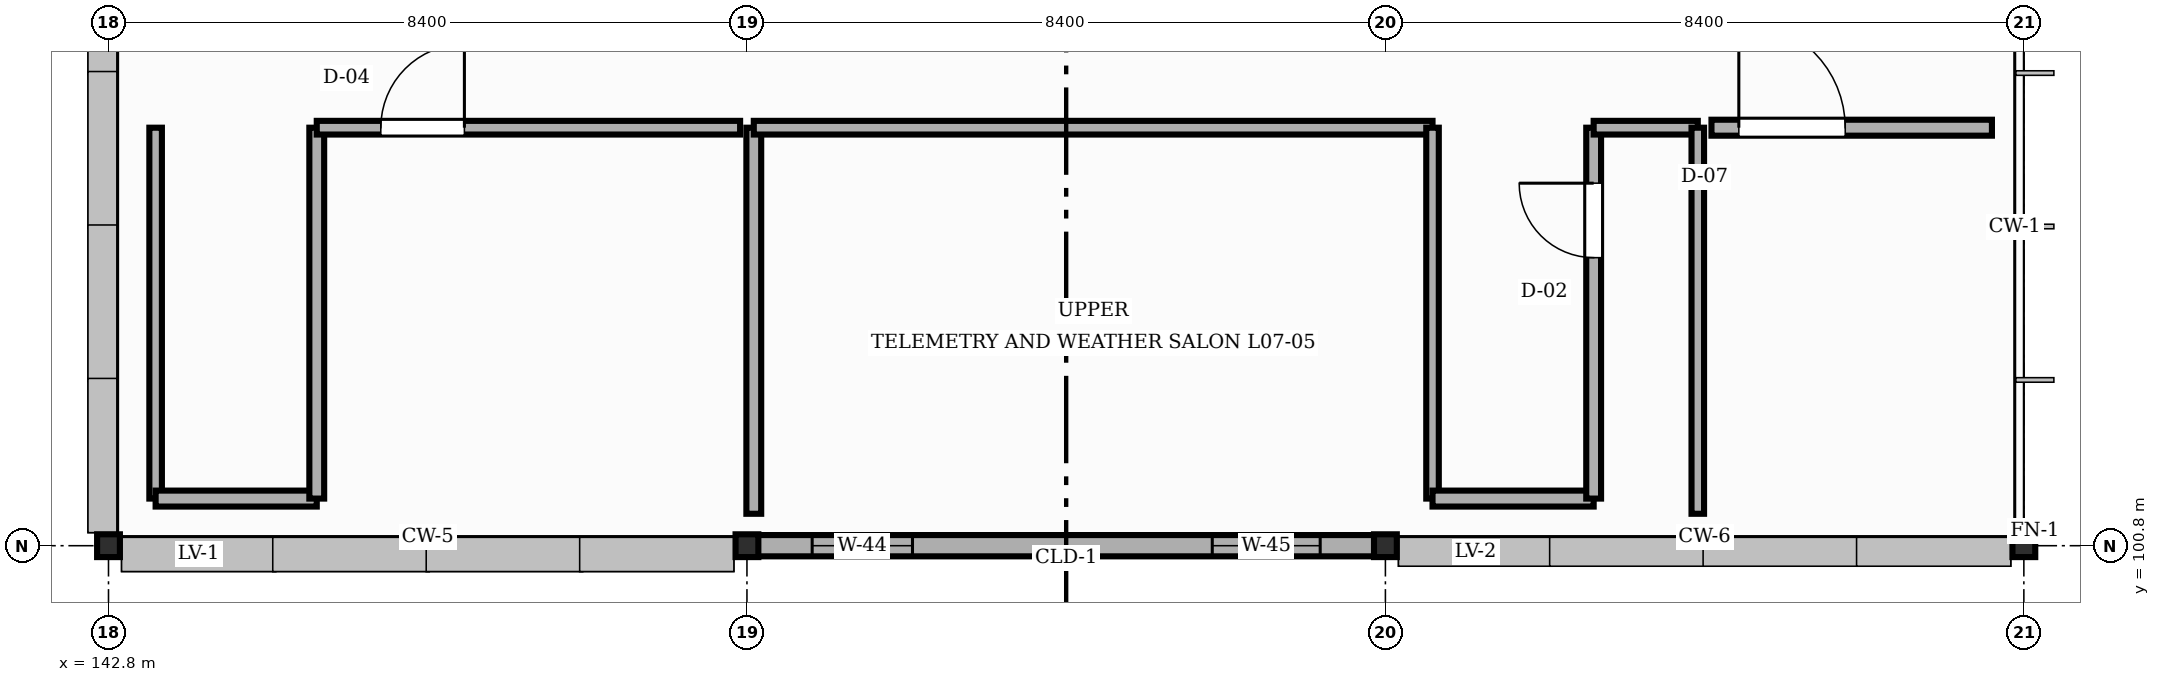
"""IFC4 building model, lengths in metres.
Left out: names, types, materials, properties, quantities, classifications, styles, units other than length and angle.
Written with IfcOpenShell. Run it as: python <this file> out.ifc"""

import sys

from ifc_helpers import new_model, si_unit, direction, frame, frame_2d, origin, origin_2d, place, context, subcontext, project, spatial, rectangle, i_section, extrude, element, fill, save


model = new_model("IFC4")
c1 = context("Model", 3, precision=1e-05, world=origin(), true_north=direction((0.0, 1.0)))
c2 = subcontext(c1, "Body", "Model", "MODEL_VIEW")
j1 = project(units=[si_unit("LENGTHUNIT", "METRE"), si_unit("PLANEANGLEUNIT", "RADIAN")], contexts=[c1])
p1 = place(None, origin())
s1 = spatial("IfcSite", under=j1, at=p1, CompositionType="ELEMENT")
p2 = place(p1, origin())
s2 = spatial("IfcBuilding", under=s1, at=p2, CompositionType="ELEMENT")
p3 = place(p2, frame((0.0, 0.0, 30.15)))
s3 = spatial("IfcBuildingStorey", under=s2, at=p3, CompositionType="ELEMENT", Elevation=30.15)
for number, where, z_axis, x_axis in (
    (1, (142.8, 100.8, 0.0), (0.0, 0.0, 1.0), (1.0, 0.0, 0.0)),
    (2, (151.2, 100.8, 0.0), (0.0, 0.0, 1.0), (1.0, 0.0, 0.0)),
    (3, (159.6, 100.8, 0.0), (0.0, 0.0, 1.0), (1.0, 0.0, 0.0)),
    (4, (168.0, 100.8, 0.0), (0.0, 0.0, 1.0), (1.0, 0.0, 0.0)),
):
    element("IfcColumn", number, at=place(p3, frame(where, z_axis=z_axis, x_axis=x_axis)), inside=s3, PredefinedType="COLUMN", context=c2, shape_type="SweptSolid", body=[
        extrude(i_section(OverallWidth=0.3, OverallDepth=0.3, WebThickness=0.011, FlangeThickness=0.019, FilletRadius=0.027, at=origin_2d()), origin(), (0.0, 0.0, 1.0), 4.2),
    ])
p4 = place(p3, frame((151.208, 100.8, 0.0), z_axis=(0.0, 0.0, 1.0), x_axis=(1.0, 0.0, 0.0)))
e5 = element("IfcWall", 5, at=p4, inside=s3, PredefinedType="STANDARD", context=c2, shape_type="SweptSolid", body=[
    extrude(rectangle(XDim=8.384, YDim=0.28, at=frame_2d((4.192, 0.0))), origin(), (0.0, 0.0, 1.0), 3.622),
])
p5 = place(p4, frame((0.85, 0.0, 0.9)))
e6 = element("IfcOpeningElement", 6, at=p5, cuts=e5, PredefinedType="OPENING", context=c2, shape_type="SweptSolid", body=[
    extrude(rectangle(XDim=1.32, YDim=1.85, at=frame_2d((0.66, 0.925))), frame((0.0, 0.15, 0.0), z_axis=(0.0, -1.0, 0.0), x_axis=(1.0, 0.0, 0.0)), (0.0, 0.0, 1.0), 0.3),
])
p6 = place(p4, frame((6.114, 0.0, 0.9)))
e7 = element("IfcOpeningElement", 7, at=p6, cuts=e5, PredefinedType="OPENING", context=c2, shape_type="SweptSolid", body=[
    extrude(rectangle(XDim=1.42, YDim=1.85, at=frame_2d((0.71, 0.925))), frame((0.0, 0.15, 0.0), z_axis=(0.0, -1.0, 0.0), x_axis=(1.0, 0.0, 0.0)), (0.0, 0.0, 1.0), 0.3),
])
p7 = place(p3, frame((151.29, 101.22, -0.004), z_axis=(0.0, 0.0, 1.0), x_axis=(0.0, 1.0, 0.0)))
e8 = element("IfcWall", 8, at=p7, inside=s3, PredefinedType="STANDARD", context=c2, shape_type="SweptSolid", body=[
    extrude(rectangle(XDim=5.08, YDim=0.195, at=frame_2d((2.54, 0.0))), origin(), (0.0, 0.0, 1.0), 3.626),
])
p8 = place(p3, frame((151.29, 106.3, -0.004), z_axis=(0.0, 0.0, 1.0), x_axis=(1.0, 0.0, 0.0)))
e9 = element("IfcWall", 9, at=p8, inside=s3, PredefinedType="STANDARD", context=c2, shape_type="SweptSolid", body=[
    extrude(rectangle(XDim=8.93, YDim=0.18, at=frame_2d((4.465, 0.0))), origin(), (0.0, 0.0, 1.0), 4.004),
])
p9 = place(p3, frame((160.22, 106.3, -0.004), z_axis=(0.0, 0.0, 1.0), x_axis=(0.0, -1.0, 0.0)))
e10 = element("IfcWall", 10, at=p9, inside=s3, PredefinedType="STANDARD", context=c2, shape_type="SweptSolid", body=[
    extrude(rectangle(XDim=4.88, YDim=0.165, at=frame_2d((2.44, 0.0))), origin(), (0.0, 0.0, 1.0), 4.004),
])
p10 = place(p3, frame((160.22, 101.42, -0.004), z_axis=(0.0, 0.0, 1.0), x_axis=(1.0, 0.0, 0.0)))
e11 = element("IfcWall", 11, at=p10, inside=s3, PredefinedType="STANDARD", context=c2, shape_type="SweptSolid", body=[
    extrude(rectangle(XDim=2.12, YDim=0.21, at=frame_2d((1.06, 0.0))), origin(), (0.0, 0.0, 1.0), 4.004),
])
p11 = place(p3, frame((162.34, 101.42, -0.004), z_axis=(0.0, 0.0, 1.0), x_axis=(0.0, 1.0, 0.0)))
e12 = element("IfcWall", 12, at=p11, inside=s3, PredefinedType="STANDARD", context=c2, shape_type="SweptSolid", body=[
    extrude(rectangle(XDim=4.88, YDim=0.195, at=frame_2d((2.44, 0.0))), origin(), (0.0, 0.0, 1.0), 3.716),
])
p12 = place(p11, frame((3.17, 0.0, 0.0)))
e13 = element("IfcOpeningElement", 13, at=p12, cuts=e12, PredefinedType="OPENING", context=c2, shape_type="SweptSolid", body=[
    extrude(rectangle(XDim=0.98, YDim=2.06, at=frame_2d((0.49, 1.03))), frame((0.0, 0.107, 0.0), z_axis=(0.0, -1.0, 0.0), x_axis=(1.0, 0.0, 0.0)), (0.0, 0.0, 1.0), 0.215),
])
p13 = place(p3, frame((162.34, 106.3, -0.004), z_axis=(0.0, 0.0, 1.0), x_axis=(1.0, 0.0, 0.0)))
e14 = element("IfcWall", 14, at=p13, inside=s3, PredefinedType="STANDARD", context=c2, shape_type="SweptSolid", body=[
    extrude(rectangle(XDim=1.37, YDim=0.18, at=frame_2d((0.685, 0.0))), origin(), (0.0, 0.0, 1.0), 4.004),
])
p14 = place(p3, frame((163.71, 106.3, -0.004), z_axis=(0.0, 0.0, 1.0), x_axis=(0.0, -1.0, 0.0)))
e15 = element("IfcWall", 15, at=p14, inside=s3, PredefinedType="STANDARD", context=c2, shape_type="SweptSolid", body=[
    extrude(rectangle(XDim=5.08, YDim=0.165, at=frame_2d((2.54, 0.0))), origin(), (0.0, 0.0, 1.0), 4.004),
])
p15 = place(p3, frame((143.42, 106.3, -0.004), z_axis=(0.0, 0.0, 1.0), x_axis=(0.0, -1.0, 0.0)))
e16 = element("IfcWall", 16, at=p15, inside=s3, PredefinedType="STANDARD", context=c2, shape_type="SweptSolid", body=[
    extrude(rectangle(XDim=4.88, YDim=0.165, at=frame_2d((2.44, 0.0))), origin(), (0.0, 0.0, 1.0), 4.004),
])
p16 = place(p3, frame((143.42, 101.42, -0.004), z_axis=(0.0, 0.0, 1.0), x_axis=(1.0, 0.0, 0.0)))
e17 = element("IfcWall", 17, at=p16, inside=s3, PredefinedType="STANDARD", context=c2, shape_type="SweptSolid", body=[
    extrude(rectangle(XDim=2.12, YDim=0.21, at=frame_2d((1.06, 0.0))), origin(), (0.0, 0.0, 1.0), 4.004),
])
p17 = place(p3, frame((145.54, 101.42, -0.004), z_axis=(0.0, 0.0, 1.0), x_axis=(0.0, 1.0, 0.0)))
e18 = element("IfcWall", 18, at=p17, inside=s3, PredefinedType="STANDARD", context=c2, shape_type="SweptSolid", body=[
    extrude(rectangle(XDim=4.88, YDim=0.195, at=frame_2d((2.44, 0.0))), origin(), (0.0, 0.0, 1.0), 3.716),
])
p18 = place(p3, frame((145.54, 106.3, -0.004), z_axis=(0.0, 0.0, 1.0), x_axis=(1.0, 0.0, 0.0)))
e19 = element("IfcWall", 19, at=p18, inside=s3, PredefinedType="STANDARD", context=c2, shape_type="SweptSolid", body=[
    extrude(rectangle(XDim=5.57, YDim=0.18, at=frame_2d((2.785, 0.0))), origin(), (0.0, 0.0, 1.0), 4.004),
])
p19 = place(p18, frame((0.843, 0.0, 0.0)))
e20 = element("IfcOpeningElement", 20, at=p19, cuts=e19, PredefinedType="OPENING", context=c2, shape_type="SweptSolid", body=[
    extrude(rectangle(XDim=1.1, YDim=2.06, at=frame_2d((0.55, 1.03))), frame((0.0, 0.1, 0.0), z_axis=(0.0, -1.0, 0.0), x_axis=(1.0, 0.0, 0.0)), (0.0, 0.0, 1.0), 0.2),
])
p20 = place(p3, frame((163.89, 106.3, -0.004), z_axis=(0.0, 0.0, 1.0), x_axis=(1.0, 0.0, 0.0)))
e21 = element("IfcWall", 21, at=p20, inside=s3, PredefinedType="STANDARD", context=c2, shape_type="SweptSolid", body=[
    extrude(rectangle(XDim=3.69, YDim=0.21, at=frame_2d((1.845, 0.0))), origin(), (0.0, 0.0, 1.0), 4.004),
])
p21 = place(p20, frame((0.36, 0.0, 0.0)))
e22 = element("IfcOpeningElement", 22, at=p21, cuts=e21, PredefinedType="OPENING", context=c2, shape_type="SweptSolid", body=[
    extrude(rectangle(XDim=1.4, YDim=2.06, at=frame_2d((0.7, 1.03))), frame((0.0, 0.115, 0.0), z_axis=(0.0, -1.0, 0.0), x_axis=(1.0, 0.0, 0.0)), (0.0, 0.0, 1.0), 0.23),
])
p22 = place(p5, origin())
e23 = element("IfcWindow", 23, at=p22, inside=s3, PartitioningType="SINGLE_PANEL", PredefinedType="WINDOW", context=c2, shape_type="SweptSolid", body=[
    extrude(rectangle(XDim=1.32, YDim=1.85, at=frame_2d((0.66, 0.925))), frame((0.0, 0.03, 0.0), z_axis=(0.0, -1.0, 0.0), x_axis=(1.0, 0.0, 0.0)), (0.0, 0.0, 1.0), 0.06),
])
fill(e6, e23)
p23 = place(p6, origin())
e24 = element("IfcWindow", 24, at=p23, inside=s3, PartitioningType="SINGLE_PANEL", PredefinedType="WINDOW", context=c2, shape_type="SweptSolid", body=[
    extrude(rectangle(XDim=1.42, YDim=1.85, at=frame_2d((0.71, 0.925))), frame((0.0, 0.03, 0.0), z_axis=(0.0, -1.0, 0.0), x_axis=(1.0, 0.0, 0.0)), (0.0, 0.0, 1.0), 0.06),
])
fill(e7, e24)
p24 = place(p12, origin())
e25 = element("IfcDoor", 25, at=p24, inside=s3, OperationType="SINGLE_SWING_RIGHT", PredefinedType="DOOR", context=c2, shape_type="SweptSolid", body=[
    extrude(rectangle(XDim=0.98, YDim=2.06, at=frame_2d((0.49, 1.03))), frame((0.0, 0.025, 0.0), z_axis=(0.0, -1.0, 0.0), x_axis=(1.0, 0.0, 0.0)), (0.0, 0.0, 1.0), 0.05),
])
fill(e13, e25)
p25 = place(p19, origin())
e26 = element("IfcDoor", 26, at=p25, inside=s3, OperationType="SINGLE_SWING_RIGHT", PredefinedType="DOOR", context=c2, shape_type="SweptSolid", body=[
    extrude(rectangle(XDim=1.1, YDim=2.06, at=frame_2d((0.55, 1.03))), frame((0.0, 0.025, 0.0), z_axis=(0.0, -1.0, 0.0), x_axis=(1.0, 0.0, 0.0)), (0.0, 0.0, 1.0), 0.05),
])
fill(e20, e26)
p26 = place(p21, origin())
e27 = element("IfcDoor", 27, at=p26, inside=s3, OperationType="SINGLE_SWING_LEFT", PredefinedType="DOOR", context=c2, shape_type="SweptSolid", body=[
    extrude(rectangle(XDim=1.4, YDim=2.06, at=frame_2d((0.7, 1.03))), frame((0.0, 0.025, 0.0), z_axis=(0.0, -1.0, 0.0), x_axis=(1.0, 0.0, 0.0)), (0.0, 0.0, 1.0), 0.05),
])
fill(e22, e27)
save(model, sys.argv[1])
